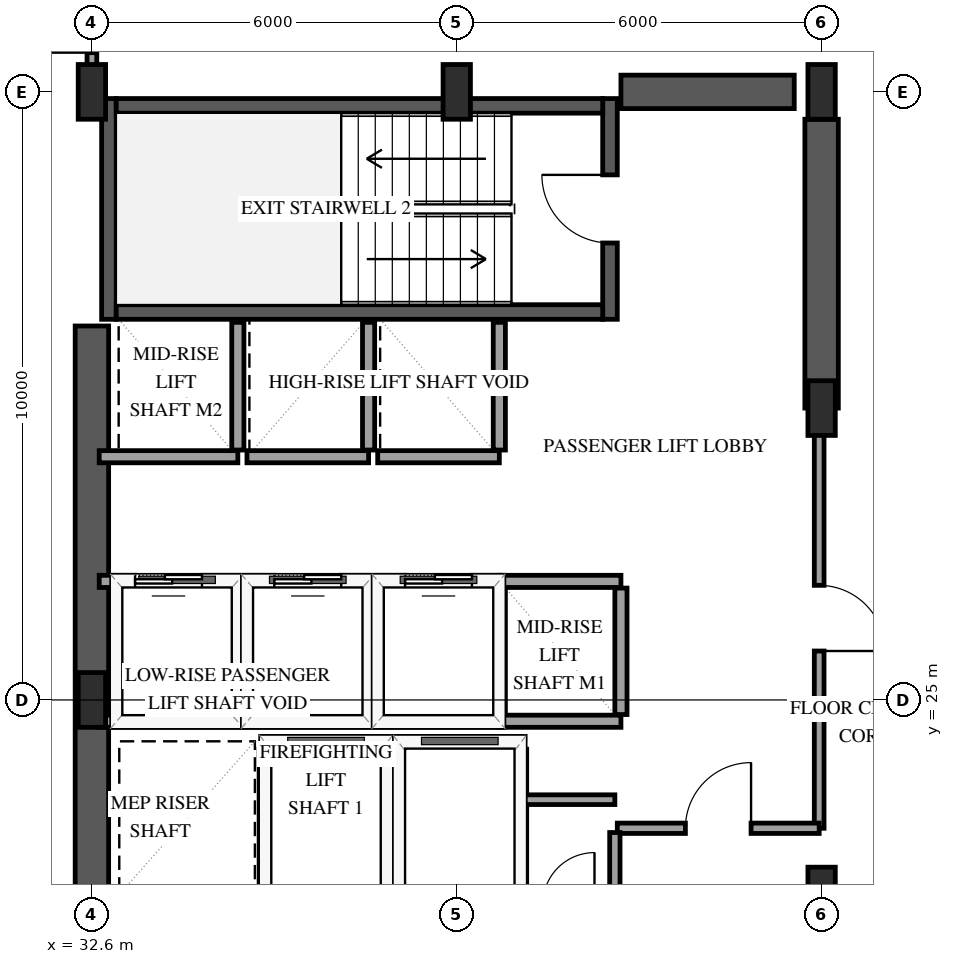
"""IFC4 building model, lengths in metres.
Left out: names, types, materials, properties, quantities, classifications, styles, units other than length and angle.
Written with IfcOpenShell. Run it as: python <this file> out.ifc"""

import sys

from ifc_helpers import new_model, si_unit, direction, frame, frame_2d, origin, origin_2d, place, context, subcontext, project, spatial, rectangle, extrude, element, fill, save


model = new_model("IFC4")
c1 = context("Model", 3, precision=1e-05, world=origin(), true_north=direction((0.0, 1.0)))
c2 = subcontext(c1, "Body", "Model", "MODEL_VIEW")
j1 = project(units=[si_unit("LENGTHUNIT", "METRE"), si_unit("PLANEANGLEUNIT", "RADIAN")], contexts=[c1])
p1 = place(None, origin())
s1 = spatial("IfcSite", under=j1, at=p1, CompositionType="ELEMENT")
p2 = place(p1, origin())
s2 = spatial("IfcBuilding", under=s1, at=p2, CompositionType="ELEMENT")
p3 = place(p2, frame((0.0, 0.0, 118.6)))
s3 = spatial("IfcBuildingStorey", under=s2, at=p3, CompositionType="ELEMENT", Elevation=118.6)
p4 = place(p3, frame((32.88, 31.26, 0.0), z_axis=(0.0, 0.0, 1.0), x_axis=(0.0, 1.0, 0.0)))
e1 = element("IfcWall", 1, at=p4, inside=s3, PredefinedType="SHEAR", context=c2, shape_type="SweptSolid", body=[
    extrude(rectangle(XDim=3.63, YDim=0.24, at=frame_2d((1.815, 0.0))), origin(), (0.0, 0.0, 1.0), 3.9),
])
p5 = place(p3, frame((41.12, 31.26, 0.0), z_axis=(0.0, 0.0, 1.0), x_axis=(0.0, 1.0, 0.0)))
e2 = element("IfcWall", 2, at=p5, inside=s3, PredefinedType="SHEAR", context=c2, shape_type="SweptSolid", body=[
    extrude(rectangle(XDim=3.63, YDim=0.24, at=frame_2d((1.815, 0.0))), origin(), (0.0, 0.0, 1.0), 3.9),
])
p6 = place(p5, frame((1.255, 0.0, 0.0)))
e3 = element("IfcOpeningElement", 3, at=p6, cuts=e2, PredefinedType="OPENING", context=c2, shape_type="SweptSolid", body=[
    extrude(rectangle(XDim=1.12, YDim=2.15, at=frame_2d((0.56, 1.075))), frame((0.0, 0.13, 0.0), z_axis=(0.0, -1.0, 0.0), x_axis=(1.0, 0.0, 0.0)), (0.0, 0.0, 1.0), 0.26),
])
for number, where, z_axis, x_axis in (
    (4, (33.0, 31.38, 0.0), (0.0, 0.0, 1.0), (1.0, 0.0, 0.0)),
    (5, (33.0, 34.77, 0.0), (0.0, 0.0, 1.0), (1.0, 0.0, 0.0)),
):
    element("IfcWall", number, at=place(p3, frame(where, z_axis=z_axis, x_axis=x_axis)), inside=s3, PredefinedType="SHEAR", context=c2, shape_type="SweptSolid", body=[
        extrude(rectangle(XDim=8.0, YDim=0.24, at=frame_2d((4.0, 0.0))), origin(), (0.0, 0.0, 1.0), 3.9),
    ])
p7 = place(p3, frame((32.6, 18.85, 0.0), z_axis=(0.0, 0.0, 1.0), x_axis=(0.0, 1.0, 0.0)))
e6 = element("IfcWall", 6, at=p7, inside=s3, PredefinedType="SHEAR", context=c2, shape_type="SweptSolid", body=[
    extrude(rectangle(XDim=12.3, YDim=0.55, at=frame_2d((6.15, 0.0))), origin(), (0.0, 0.0, 1.0), 3.9),
])
p8 = place(p3, frame((41.3, 35.0, 0.0), z_axis=(0.0, 0.0, 1.0), x_axis=(1.0, 0.0, 0.0)))
e7 = element("IfcWall", 7, at=p8, inside=s3, PredefinedType="SHEAR", context=c2, shape_type="SweptSolid", body=[
    extrude(rectangle(XDim=2.85, YDim=0.55, at=frame_2d((1.425, 0.0))), origin(), (0.0, 0.0, 1.0), 3.9),
])
p9 = place(p3, frame((44.6, 29.8, 0.0), z_axis=(0.0, 0.0, 1.0), x_axis=(0.0, 1.0, 0.0)))
e8 = element("IfcWall", 8, at=p9, inside=s3, PredefinedType="SHEAR", context=c2, shape_type="SweptSolid", body=[
    extrude(rectangle(XDim=4.75, YDim=0.55, at=frame_2d((2.375, 0.0))), origin(), (0.0, 0.0, 1.0), 3.9),
])
for number, where, z_axis, x_axis in (
    (9, (32.6, 25.0, 0.0), (0.0, 0.0, 1.0), (1.0, 0.0, 0.0)),
    (10, (32.6, 35.0, 0.0), (0.0, 0.0, 1.0), (1.0, 0.0, 0.0)),
    (11, (38.6, 35.0, 0.0), (0.0, 0.0, 1.0), (1.0, 0.0, 0.0)),
    (12, (44.6, 21.8, 0.0), (0.0, 0.0, 1.0), (1.0, 0.0, 0.0)),
    (13, (44.6, 29.8, 0.0), (0.0, 0.0, 1.0), (1.0, 0.0, 0.0)),
    (14, (44.6, 35.0, 0.0), (0.0, 0.0, 1.0), (1.0, 0.0, 0.0)),
):
    element("IfcColumn", number, at=place(p3, frame(where, z_axis=z_axis, x_axis=x_axis)), inside=s3, PredefinedType="PILASTER", context=c2, shape_type="SweptSolid", body=[
        extrude(rectangle(XDim=0.45, YDim=0.9, at=origin_2d()), origin(), (0.0, 0.0, 1.0), 3.9),
    ])
p10 = place(p3, frame((35.45, 24.3, 0.0), z_axis=(0.0, 0.0, 1.0), x_axis=(1.0, 0.0, 0.0)))
e15 = element("IfcWall", 15, at=p10, inside=s3, PredefinedType="SOLIDWALL", context=c2, shape_type="SweptSolid", body=[
    extrude(rectangle(XDim=2.0, YDim=0.2, at=frame_2d((1.0, 0.0))), origin(), (0.0, 0.0, 1.0), 3.6),
])
for number, where, z_axis, x_axis in (
    (16, (35.45, 21.81, 0.0), (0.0, 0.0, 1.0), (0.0, 1.0, 0.0)),
    (17, (37.45, 21.81, 0.0), (0.0, 0.0, 1.0), (0.0, 1.0, 0.0)),
):
    element("IfcWall", number, at=place(p3, frame(where, z_axis=z_axis, x_axis=x_axis)), inside=s3, PredefinedType="SOLIDWALL", context=c2, shape_type="SweptSolid", body=[
        extrude(rectangle(XDim=2.38, YDim=0.2, at=frame_2d((1.19, 0.0))), origin(), (0.0, 0.0, 1.0), 3.6),
    ])
p11 = place(p3, frame((37.65, 24.3, 0.0), z_axis=(0.0, 0.0, 1.0), x_axis=(1.0, 0.0, 0.0)))
e18 = element("IfcWall", 18, at=p11, inside=s3, PredefinedType="SOLIDWALL", context=c2, shape_type="SweptSolid", body=[
    extrude(rectangle(XDim=2.0, YDim=0.2, at=frame_2d((1.0, 0.0))), origin(), (0.0, 0.0, 1.0), 3.6),
])
p12 = place(p3, frame((39.65, 21.81, 0.0), z_axis=(0.0, 0.0, 1.0), x_axis=(0.0, 1.0, 0.0)))
e19 = element("IfcWall", 19, at=p12, inside=s3, PredefinedType="SOLIDWALL", context=c2, shape_type="SweptSolid", body=[
    extrude(rectangle(XDim=2.38, YDim=0.2, at=frame_2d((1.19, 0.0))), origin(), (0.0, 0.0, 1.0), 3.6),
])
p13 = place(p3, frame((32.72, 24.65, 0.0), z_axis=(0.0, 0.0, 1.0), x_axis=(1.0, 0.0, 0.0)))
e20 = element("IfcWall", 20, at=p13, inside=s3, PredefinedType="SOLIDWALL", context=c2, shape_type="SweptSolid", body=[
    extrude(rectangle(XDim=2.28, YDim=0.2, at=frame_2d((1.14, 0.0))), origin(), (0.0, 0.0, 1.0), 3.6),
])
p14 = place(p3, frame((32.72, 26.95, 0.0), z_axis=(0.0, 0.0, 1.0), x_axis=(1.0, 0.0, 0.0)))
e21 = element("IfcWall", 21, at=p14, inside=s3, PredefinedType="SOLIDWALL", context=c2, shape_type="SweptSolid", body=[
    extrude(rectangle(XDim=2.28, YDim=0.2, at=frame_2d((1.14, 0.0))), origin(), (0.0, 0.0, 1.0), 3.6),
])
p15 = place(p14, frame((0.59, 0.0, 0.0)))
e22 = element("IfcOpeningElement", 22, at=p15, cuts=e21, PredefinedType="OPENING", context=c2, shape_type="SweptSolid", body=[
    extrude(rectangle(XDim=1.1, YDim=2.15, at=frame_2d((0.55, 1.075))), frame((0.0, 0.11, 0.0), z_axis=(0.0, -1.0, 0.0), x_axis=(1.0, 0.0, 0.0)), (0.0, 0.0, 1.0), 0.22),
])
p16 = place(p3, frame((35.0, 24.76, 0.0), z_axis=(0.0, 0.0, 1.0), x_axis=(0.0, 1.0, 0.0)))
e23 = element("IfcWall", 23, at=p16, inside=s3, PredefinedType="SOLIDWALL", context=c2, shape_type="SweptSolid", body=[
    extrude(rectangle(XDim=2.08, YDim=0.2, at=frame_2d((1.04, 0.0))), origin(), (0.0, 0.0, 1.0), 3.6),
])
p17 = place(p3, frame((35.15, 24.65, 0.0), z_axis=(0.0, 0.0, 1.0), x_axis=(1.0, 0.0, 0.0)))
e24 = element("IfcWall", 24, at=p17, inside=s3, PredefinedType="SOLIDWALL", context=c2, shape_type="SweptSolid", body=[
    extrude(rectangle(XDim=2.0, YDim=0.2, at=frame_2d((1.0, 0.0))), origin(), (0.0, 0.0, 1.0), 3.6),
])
p18 = place(p3, frame((35.15, 26.95, 0.0), z_axis=(0.0, 0.0, 1.0), x_axis=(1.0, 0.0, 0.0)))
e25 = element("IfcWall", 25, at=p18, inside=s3, PredefinedType="SOLIDWALL", context=c2, shape_type="SweptSolid", body=[
    extrude(rectangle(XDim=2.0, YDim=0.2, at=frame_2d((1.0, 0.0))), origin(), (0.0, 0.0, 1.0), 3.6),
])
p19 = place(p18, frame((0.45, 0.0, 0.0)))
e26 = element("IfcOpeningElement", 26, at=p19, cuts=e25, PredefinedType="OPENING", context=c2, shape_type="SweptSolid", body=[
    extrude(rectangle(XDim=1.1, YDim=2.15, at=frame_2d((0.55, 1.075))), frame((0.0, 0.11, 0.0), z_axis=(0.0, -1.0, 0.0), x_axis=(1.0, 0.0, 0.0)), (0.0, 0.0, 1.0), 0.22),
])
p20 = place(p3, frame((37.15, 24.76, 0.0), z_axis=(0.0, 0.0, 1.0), x_axis=(0.0, 1.0, 0.0)))
e27 = element("IfcWall", 27, at=p20, inside=s3, PredefinedType="SOLIDWALL", context=c2, shape_type="SweptSolid", body=[
    extrude(rectangle(XDim=2.08, YDim=0.2, at=frame_2d((1.04, 0.0))), origin(), (0.0, 0.0, 1.0), 3.6),
])
p21 = place(p3, frame((37.3, 24.65, 0.0), z_axis=(0.0, 0.0, 1.0), x_axis=(1.0, 0.0, 0.0)))
e28 = element("IfcWall", 28, at=p21, inside=s3, PredefinedType="SOLIDWALL", context=c2, shape_type="SweptSolid", body=[
    extrude(rectangle(XDim=2.0, YDim=0.2, at=frame_2d((1.0, 0.0))), origin(), (0.0, 0.0, 1.0), 3.6),
])
p22 = place(p3, frame((37.3, 26.95, 0.0), z_axis=(0.0, 0.0, 1.0), x_axis=(1.0, 0.0, 0.0)))
e29 = element("IfcWall", 29, at=p22, inside=s3, PredefinedType="SOLIDWALL", context=c2, shape_type="SweptSolid", body=[
    extrude(rectangle(XDim=2.0, YDim=0.2, at=frame_2d((1.0, 0.0))), origin(), (0.0, 0.0, 1.0), 3.6),
])
p23 = place(p22, frame((0.45, 0.0, 0.0)))
e30 = element("IfcOpeningElement", 30, at=p23, cuts=e29, PredefinedType="OPENING", context=c2, shape_type="SweptSolid", body=[
    extrude(rectangle(XDim=1.1, YDim=2.15, at=frame_2d((0.55, 1.075))), frame((0.0, 0.11, 0.0), z_axis=(0.0, -1.0, 0.0), x_axis=(1.0, 0.0, 0.0)), (0.0, 0.0, 1.0), 0.22),
])
p24 = place(p3, frame((39.3, 24.76, 0.0), z_axis=(0.0, 0.0, 1.0), x_axis=(0.0, 1.0, 0.0)))
e31 = element("IfcWall", 31, at=p24, inside=s3, PredefinedType="SOLIDWALL", context=c2, shape_type="SweptSolid", body=[
    extrude(rectangle(XDim=2.08, YDim=0.2, at=frame_2d((1.04, 0.0))), origin(), (0.0, 0.0, 1.0), 3.6),
])
for number, where, z_axis, x_axis in (
    (32, (39.3, 24.65, 0.0), (0.0, 0.0, 1.0), (1.0, 0.0, 0.0)),
    (33, (39.3, 26.95, 0.0), (0.0, 0.0, 1.0), (1.0, 0.0, 0.0)),
):
    element("IfcWall", number, at=place(p3, frame(where, z_axis=z_axis, x_axis=x_axis)), inside=s3, PredefinedType="SOLIDWALL", context=c2, shape_type="SweptSolid", body=[
        extrude(rectangle(XDim=2.0, YDim=0.2, at=frame_2d((1.0, 0.0))), origin(), (0.0, 0.0, 1.0), 3.6),
    ])
p25 = place(p3, frame((41.3, 24.76, 0.0), z_axis=(0.0, 0.0, 1.0), x_axis=(0.0, 1.0, 0.0)))
e34 = element("IfcWall", 34, at=p25, inside=s3, PredefinedType="SOLIDWALL", context=c2, shape_type="SweptSolid", body=[
    extrude(rectangle(XDim=2.08, YDim=0.2, at=frame_2d((1.04, 0.0))), origin(), (0.0, 0.0, 1.0), 3.6),
])
p26 = place(p3, frame((32.72, 29.0, 0.0), z_axis=(0.0, 0.0, 1.0), x_axis=(1.0, 0.0, 0.0)))
e35 = element("IfcWall", 35, at=p26, inside=s3, PredefinedType="SOLIDWALL", context=c2, shape_type="SweptSolid", body=[
    extrude(rectangle(XDim=2.28, YDim=0.2, at=frame_2d((1.14, 0.0))), origin(), (0.0, 0.0, 1.0), 3.6),
])
p27 = place(p3, frame((35.0, 29.11, 0.0), z_axis=(0.0, 0.0, 1.0), x_axis=(0.0, 1.0, 0.0)))
e36 = element("IfcWall", 36, at=p27, inside=s3, PredefinedType="SOLIDWALL", context=c2, shape_type="SweptSolid", body=[
    extrude(rectangle(XDim=2.1, YDim=0.2, at=frame_2d((1.05, 0.0))), origin(), (0.0, 0.0, 1.0), 3.6),
])
p28 = place(p3, frame((35.15, 29.0, 0.0), z_axis=(0.0, 0.0, 1.0), x_axis=(1.0, 0.0, 0.0)))
e37 = element("IfcWall", 37, at=p28, inside=s3, PredefinedType="SOLIDWALL", context=c2, shape_type="SweptSolid", body=[
    extrude(rectangle(XDim=2.0, YDim=0.2, at=frame_2d((1.0, 0.0))), origin(), (0.0, 0.0, 1.0), 3.6),
])
p29 = place(p3, frame((37.15, 29.11, 0.0), z_axis=(0.0, 0.0, 1.0), x_axis=(0.0, 1.0, 0.0)))
e38 = element("IfcWall", 38, at=p29, inside=s3, PredefinedType="SOLIDWALL", context=c2, shape_type="SweptSolid", body=[
    extrude(rectangle(XDim=2.1, YDim=0.2, at=frame_2d((1.05, 0.0))), origin(), (0.0, 0.0, 1.0), 3.6),
])
p30 = place(p3, frame((37.3, 29.0, 0.0), z_axis=(0.0, 0.0, 1.0), x_axis=(1.0, 0.0, 0.0)))
e39 = element("IfcWall", 39, at=p30, inside=s3, PredefinedType="SOLIDWALL", context=c2, shape_type="SweptSolid", body=[
    extrude(rectangle(XDim=2.0, YDim=0.2, at=frame_2d((1.0, 0.0))), origin(), (0.0, 0.0, 1.0), 3.6),
])
p31 = place(p3, frame((39.3, 29.11, 0.0), z_axis=(0.0, 0.0, 1.0), x_axis=(0.0, 1.0, 0.0)))
e40 = element("IfcWall", 40, at=p31, inside=s3, PredefinedType="SOLIDWALL", context=c2, shape_type="SweptSolid", body=[
    extrude(rectangle(XDim=2.1, YDim=0.2, at=frame_2d((1.05, 0.0))), origin(), (0.0, 0.0, 1.0), 3.6),
])
p32 = place(p3, frame((44.56, 29.8, 0.0), z_axis=(0.0, 0.0, 1.0), x_axis=(0.0, -1.0, 0.0)))
e41 = element("IfcWall", 41, at=p32, inside=s3, PredefinedType="PARTITIONING", context=c2, shape_type="SweptSolid", body=[
    extrude(rectangle(XDim=6.91, YDim=0.16, at=frame_2d((3.455, 0.0))), origin(), (0.0, 0.0, 1.0), 2.64),
])
p33 = place(p32, frame((2.915, 0.0, 0.0)))
e42 = element("IfcOpeningElement", 42, at=p33, cuts=e41, PredefinedType="OPENING", context=c2, shape_type="SweptSolid", body=[
    extrude(rectangle(XDim=1.08, YDim=2.15, at=frame_2d((0.54, 1.075))), frame((0.0, 0.09, 0.0), z_axis=(0.0, -1.0, 0.0), x_axis=(1.0, 0.0, 0.0)), (0.0, 0.0, 1.0), 0.18),
])
p34 = place(p3, frame((41.24, 22.89, 0.0), z_axis=(0.0, 0.0, 1.0), x_axis=(1.0, 0.0, 0.0)))
e43 = element("IfcWall", 43, at=p34, inside=s3, PredefinedType="PARTITIONING", context=c2, shape_type="SweptSolid", body=[
    extrude(rectangle(XDim=3.32, YDim=0.17, at=frame_2d((1.66, 0.0))), origin(), (0.0, 0.0, 1.0), 3.6),
])
p35 = place(p34, frame((1.12, 0.0, 0.0)))
e44 = element("IfcOpeningElement", 44, at=p35, cuts=e43, PredefinedType="OPENING", context=c2, shape_type="SweptSolid", body=[
    extrude(rectangle(XDim=1.08, YDim=2.15, at=frame_2d((0.54, 1.075))), frame((0.0, 0.095, 0.0), z_axis=(0.0, -1.0, 0.0), x_axis=(1.0, 0.0, 0.0)), (0.0, 0.0, 1.0), 0.19),
])
p36 = place(p3, frame((32.6, 35.07, 0.0), z_axis=(0.0, 0.0, 1.0), x_axis=(0.0, 1.0, 0.0)))
e45 = element("IfcWall", 45, at=p36, inside=s3, PredefinedType="PARTITIONING", context=c2, shape_type="SweptSolid", body=[
    extrude(rectangle(XDim=1.91, YDim=0.16, at=frame_2d((0.955, 0.0))), origin(), (0.0, 0.0, 1.0), 3.6),
])
p37 = place(p36, frame((0.575, 0.0, 0.0)))
e46 = element("IfcOpeningElement", 46, at=p37, cuts=e45, PredefinedType="OPENING", context=c2, shape_type="SweptSolid", body=[
    extrude(rectangle(XDim=0.95, YDim=2.15, at=frame_2d((0.475, 1.075))), frame((0.0, 0.09, 0.0), z_axis=(0.0, -1.0, 0.0), x_axis=(1.0, 0.0, 0.0)), (0.0, 0.0, 1.0), 0.18),
])
p38 = place(p3, frame((41.2, 21.7, 0.0), z_axis=(0.0, 0.0, 1.0), x_axis=(0.0, 1.0, 0.0)))
e47 = element("IfcWall", 47, at=p38, inside=s3, PredefinedType="PARTITIONING", context=c2, shape_type="SweptSolid", body=[
    extrude(rectangle(XDim=1.12, YDim=0.17, at=frame_2d((0.56, 0.0))), origin(), (0.0, 0.0, 1.0), 3.6),
])
p39 = place(p3, frame((41.2, 23.36, 0.0), z_axis=(0.0, 0.0, 1.0), x_axis=(-1.0, 0.0, 0.0)))
e48 = element("IfcWall", 48, at=p39, inside=s3, PredefinedType="PARTITIONING", context=c2, shape_type="SweptSolid", body=[
    extrude(rectangle(XDim=1.48, YDim=0.16, at=frame_2d((0.74, 0.0))), origin(), (0.0, 0.0, 1.0), 3.6),
])
p40 = place(p15, origin())
e49 = element("IfcDoor", 49, at=p40, inside=s3, OperationType="SLIDING_TO_LEFT", PredefinedType="DOOR", context=c2, shape_type="SweptSolid", body=[
    extrude(rectangle(XDim=1.1, YDim=2.15, at=frame_2d((0.55, 1.075))), frame((0.0, 0.025, 0.0), z_axis=(0.0, -1.0, 0.0), x_axis=(1.0, 0.0, 0.0)), (0.0, 0.0, 1.0), 0.05),
])
fill(e22, e49)
p41 = place(p19, origin())
e50 = element("IfcDoor", 50, at=p41, inside=s3, OperationType="SLIDING_TO_LEFT", PredefinedType="DOOR", context=c2, shape_type="SweptSolid", body=[
    extrude(rectangle(XDim=1.1, YDim=2.15, at=frame_2d((0.55, 1.075))), frame((0.0, 0.025, 0.0), z_axis=(0.0, -1.0, 0.0), x_axis=(1.0, 0.0, 0.0)), (0.0, 0.0, 1.0), 0.05),
])
fill(e26, e50)
p42 = place(p23, origin())
e51 = element("IfcDoor", 51, at=p42, inside=s3, OperationType="SLIDING_TO_LEFT", PredefinedType="DOOR", context=c2, shape_type="SweptSolid", body=[
    extrude(rectangle(XDim=1.1, YDim=2.15, at=frame_2d((0.55, 1.075))), frame((0.0, 0.025, 0.0), z_axis=(0.0, -1.0, 0.0), x_axis=(1.0, 0.0, 0.0)), (0.0, 0.0, 1.0), 0.05),
])
fill(e30, e51)
p43 = place(p6, origin())
e52 = element("IfcDoor", 52, at=p43, inside=s3, OperationType="SINGLE_SWING_RIGHT", PredefinedType="DOOR", context=c2, shape_type="SweptSolid", body=[
    extrude(rectangle(XDim=1.12, YDim=2.15, at=frame_2d((0.56, 1.075))), frame((0.0, 0.025, 0.0), z_axis=(0.0, -1.0, 0.0), x_axis=(1.0, 0.0, 0.0)), (0.0, 0.0, 1.0), 0.05),
])
fill(e3, e52)
p44 = place(p33, origin())
e53 = element("IfcDoor", 53, at=p44, inside=s3, OperationType="SINGLE_SWING_RIGHT", PredefinedType="DOOR", context=c2, shape_type="SweptSolid", body=[
    extrude(rectangle(XDim=1.08, YDim=2.15, at=frame_2d((0.54, 1.075))), frame((0.0, 0.025, 0.0), z_axis=(0.0, -1.0, 0.0), x_axis=(1.0, 0.0, 0.0)), (0.0, 0.0, 1.0), 0.05),
])
fill(e42, e53)
p45 = place(p35, origin())
e54 = element("IfcDoor", 54, at=p45, inside=s3, OperationType="SINGLE_SWING_RIGHT", PredefinedType="DOOR", context=c2, shape_type="SweptSolid", body=[
    extrude(rectangle(XDim=1.08, YDim=2.15, at=frame_2d((0.54, 1.075))), frame((0.0, 0.025, 0.0), z_axis=(0.0, -1.0, 0.0), x_axis=(1.0, 0.0, 0.0)), (0.0, 0.0, 1.0), 0.05),
])
fill(e44, e54)
p46 = place(p37, origin())
e55 = element("IfcDoor", 55, at=p46, inside=s3, OperationType="SINGLE_SWING_LEFT", PredefinedType="DOOR", context=c2, shape_type="SweptSolid", body=[
    extrude(rectangle(XDim=0.95, YDim=2.15, at=frame_2d((0.475, 1.075))), frame((0.0, 0.025, 0.0), z_axis=(0.0, -1.0, 0.0), x_axis=(1.0, 0.0, 0.0)), (0.0, 0.0, 1.0), 0.05),
])
fill(e46, e55)
save(model, sys.argv[1])
